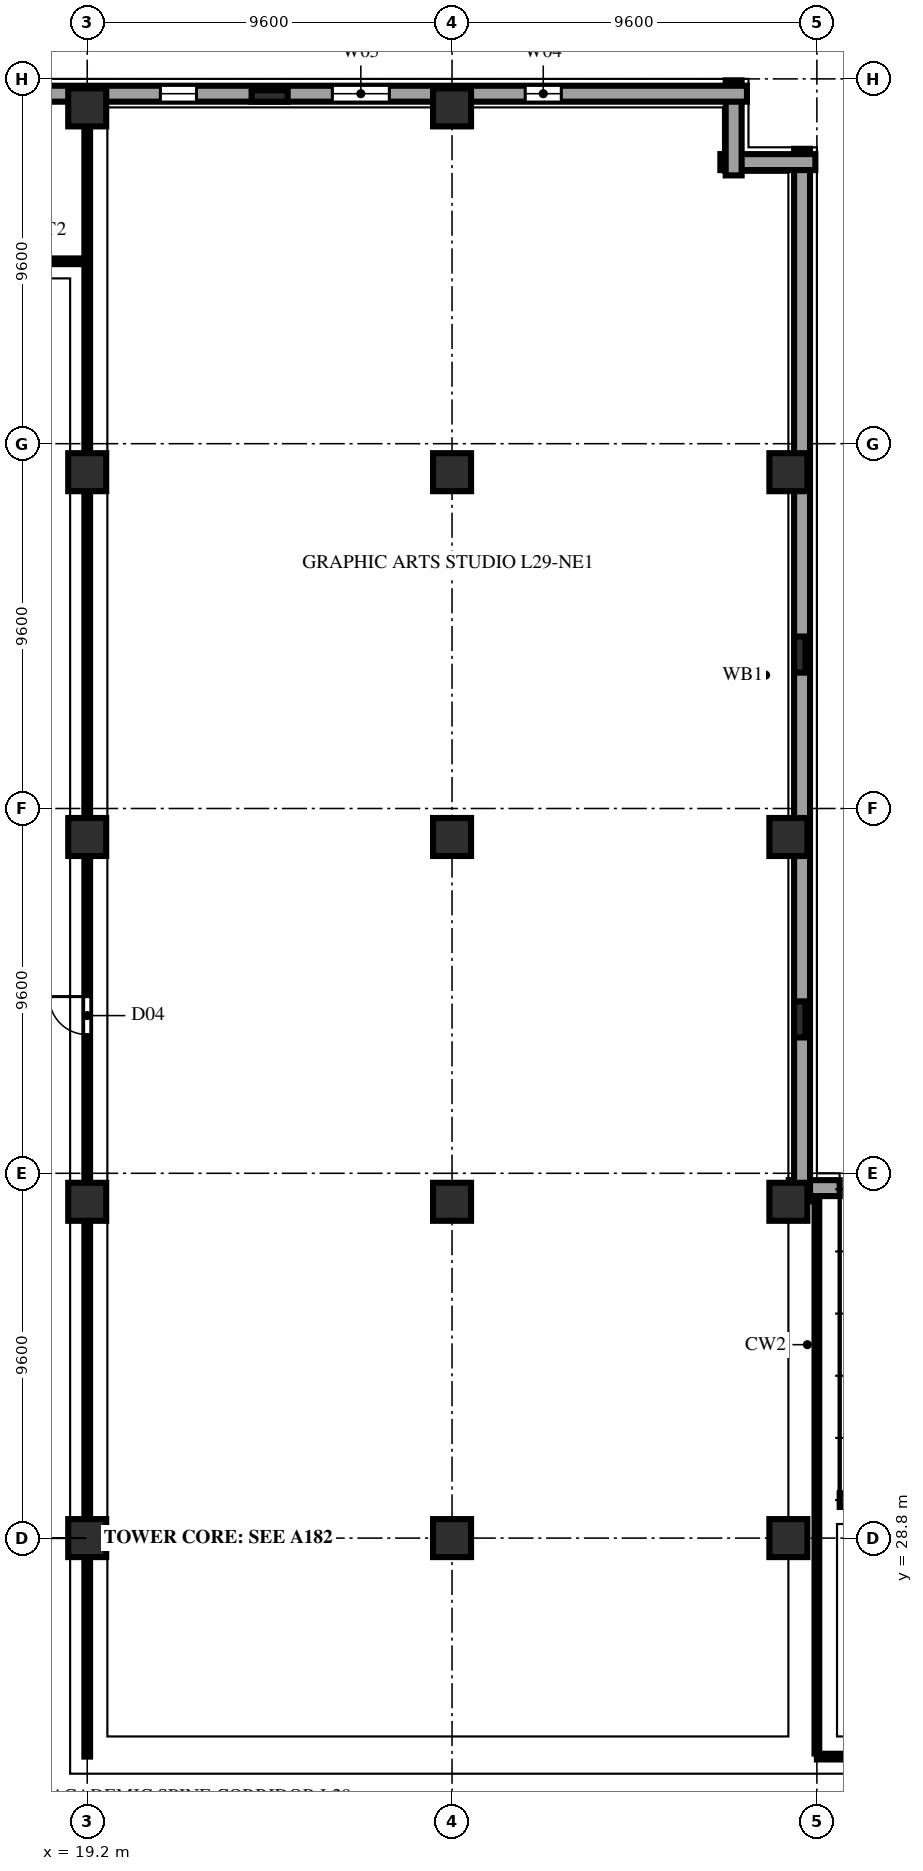
"""IFC4 building model, lengths in metres.
Left out: names, types, materials, properties, quantities, classifications, styles, units other than length and angle.
Written with IfcOpenShell. Run it as: python <this file> out.ifc"""

import sys

from ifc_helpers import new_model, si_unit, direction, frame, frame_2d, origin, origin_2d, place, context, subcontext, project, spatial, rectangle, extrude, element, fill, save


model = new_model("IFC4")
c1 = context("Model", 3, precision=1e-05, world=origin(), true_north=direction((0.0, 1.0)))
c2 = subcontext(c1, "Body", "Model", "MODEL_VIEW")
j1 = project(units=[si_unit("LENGTHUNIT", "METRE"), si_unit("PLANEANGLEUNIT", "RADIAN")], contexts=[c1])
p1 = place(None, origin())
s1 = spatial("IfcSite", under=j1, at=p1, CompositionType="ELEMENT")
p2 = place(p1, origin())
s2 = spatial("IfcBuilding", under=s1, at=p2, CompositionType="ELEMENT")
p3 = place(p2, frame((0.0, 0.0, 116.6)))
s3 = spatial("IfcBuildingStorey", under=s2, at=p3, CompositionType="ELEMENT", Elevation=116.6)
for number, where, z_axis, x_axis in (
    (1, (19.2, 28.8, 0.0), (0.0, 0.0, 1.0), (1.0, 0.0, 0.0)),
    (2, (19.2, 37.65, 0.0), (0.0, 0.0, 1.0), (1.0, 0.0, 0.0)),
    (3, (19.2, 47.25, 0.0), (0.0, 0.0, 1.0), (1.0, 0.0, 0.0)),
    (4, (19.2, 56.85, 0.0), (0.0, 0.0, 1.0), (1.0, 0.0, 0.0)),
    (5, (19.2, 66.45, 0.0), (0.0, 0.0, 1.0), (1.0, 0.0, 0.0)),
    (6, (28.8, 28.8, 0.0), (0.0, 0.0, 1.0), (1.0, 0.0, 0.0)),
    (7, (28.8, 37.65, 0.0), (0.0, 0.0, 1.0), (1.0, 0.0, 0.0)),
    (8, (28.8, 47.25, 0.0), (0.0, 0.0, 1.0), (1.0, 0.0, 0.0)),
    (9, (28.8, 56.85, 0.0), (0.0, 0.0, 1.0), (1.0, 0.0, 0.0)),
    (10, (28.8, 66.45, 0.0), (0.0, 0.0, 1.0), (1.0, 0.0, 0.0)),
    (11, (37.65, 28.8, 0.0), (0.0, 0.0, 1.0), (1.0, 0.0, 0.0)),
    (12, (37.65, 37.65, 0.0), (0.0, 0.0, 1.0), (1.0, 0.0, 0.0)),
    (13, (37.65, 47.25, 0.0), (0.0, 0.0, 1.0), (1.0, 0.0, 0.0)),
    (14, (37.65, 56.85, 0.0), (0.0, 0.0, 1.0), (1.0, 0.0, 0.0)),
):
    element("IfcColumn", number, at=place(p3, frame(where, z_axis=z_axis, x_axis=x_axis)), inside=s3, PredefinedType="COLUMN", context=c2, shape_type="SweptSolid", body=[
        extrude(rectangle(XDim=1.0, YDim=1.0, at=origin_2d()), origin(), (0.0, 0.0, 1.0), 3.8),
    ])
for number, where, z_axis, x_axis in (
    (15, (24.0, 66.75, 0.0), (0.0, 0.0, 1.0), (1.0, 0.0, 0.0)),
    (16, (37.95, 42.45, 0.0), (0.0, 0.0, 1.0), (0.0, 1.0, 0.0)),
    (17, (37.95, 52.05, 0.0), (0.0, 0.0, 1.0), (0.0, 1.0, 0.0)),
):
    element("IfcColumn", number, at=place(p3, frame(where, z_axis=z_axis, x_axis=x_axis)), inside=s3, PredefinedType="PILASTER", context=c2, shape_type="SweptSolid", body=[
        extrude(rectangle(XDim=0.95, YDim=0.3, at=origin_2d()), origin(), (0.0, 0.0, 1.0), 3.8),
    ])
p4 = place(p3, frame((39.0, 38.01, 0.0), z_axis=(0.0, 0.0, 1.0), x_axis=(-1.0, 0.0, 0.0)))
e18 = element("IfcWall", 18, at=p4, inside=s3, PredefinedType="SOLIDWALL", context=c2, shape_type="SweptSolid", body=[
    extrude(rectangle(XDim=1.34, YDim=0.42, at=frame_2d((0.67, 0.0))), origin(), (0.0, 0.0, 1.0), 2.14),
])
p5 = place(p3, frame((38.01, 37.66, 0.0), z_axis=(0.0, 0.0, 1.0), x_axis=(0.0, 1.0, 0.0)))
e19 = element("IfcWall", 19, at=p5, inside=s3, PredefinedType="SOLIDWALL", context=c2, shape_type="SweptSolid", body=[
    extrude(rectangle(XDim=27.7, YDim=0.42, at=frame_2d((13.85, 0.0))), origin(), (0.0, 0.0, 1.0), 3.54),
])
for number, where, z_axis, x_axis in (
    (20, (38.36, 65.01, 0.0), (0.0, 0.0, 1.0), (-1.0, 0.0, 0.0)),
    (21, (36.21, 64.66, 0.0), (0.0, 0.0, 1.0), (0.0, 1.0, 0.0)),
):
    element("IfcWall", number, at=place(p3, frame(where, z_axis=z_axis, x_axis=x_axis)), inside=s3, PredefinedType="SOLIDWALL", context=c2, shape_type="SweptSolid", body=[
        extrude(rectangle(XDim=2.5, YDim=0.42, at=frame_2d((1.25, 0.0))), origin(), (0.0, 0.0, 1.0), 3.54),
    ])
p6 = place(p3, frame((36.56, 66.81, 0.0), z_axis=(0.0, 0.0, 1.0), x_axis=(-1.0, 0.0, 0.0)))
e22 = element("IfcWall", 22, at=p6, inside=s3, PredefinedType="SOLIDWALL", context=c2, shape_type="SweptSolid", body=[
    extrude(rectangle(XDim=34.72, YDim=0.42, at=frame_2d((17.36, 0.0))), origin(), (0.0, 0.0, 1.0), 3.54),
])
p7 = place(p6, frame((4.885, 0.0, 0.9)))
e23 = element("IfcOpeningElement", 23, at=p7, cuts=e22, PredefinedType="OPENING", context=c2, shape_type="SweptSolid", body=[
    extrude(rectangle(XDim=0.95, YDim=1.85, at=frame_2d((0.475, 0.925))), frame((0.0, 0.222, 0.0), z_axis=(0.0, -1.0, 0.0), x_axis=(1.0, 0.0, 0.0)), (0.0, 0.0, 1.0), 0.444),
])
p8 = place(p6, frame((9.41, 0.0, 0.9)))
e24 = element("IfcOpeningElement", 24, at=p8, cuts=e22, PredefinedType="OPENING", context=c2, shape_type="SweptSolid", body=[
    extrude(rectangle(XDim=1.5, YDim=1.85, at=frame_2d((0.75, 0.925))), frame((0.0, 0.222, 0.0), z_axis=(0.0, -1.0, 0.0), x_axis=(1.0, 0.0, 0.0)), (0.0, 0.0, 1.0), 0.444),
])
p9 = place(p6, frame((14.485, 0.0, 0.9)))
e25 = element("IfcOpeningElement", 25, at=p9, cuts=e22, PredefinedType="OPENING", context=c2, shape_type="SweptSolid", body=[
    extrude(rectangle(XDim=0.95, YDim=1.85, at=frame_2d((0.475, 0.925))), frame((0.0, 0.222, 0.0), z_axis=(0.0, -1.0, 0.0), x_axis=(1.0, 0.0, 0.0)), (0.0, 0.0, 1.0), 0.444),
])
p10 = place(p3, frame((39.0, 29.8, 0.0), z_axis=(0.0, 0.0, 1.0), x_axis=(1.0, 0.0, 0.0)))
e26 = element("IfcWall", 26, at=p10, inside=s3, PredefinedType="SOLIDWALL", context=c2, shape_type="SweptSolid", body=[
    extrude(rectangle(XDim=2.8, YDim=0.36, at=frame_2d((1.4, 0.0))), origin(), (0.0, 0.0, 1.0), 3.54),
])
p11 = place(p3, frame((17.05, 62.4, 0.0), z_axis=(0.0, 0.0, 1.0), x_axis=(1.0, 0.0, 0.0)))
e27 = element("IfcWall", 27, at=p11, inside=s3, PredefinedType="PARTITIONING", context=c2, shape_type="SweptSolid", body=[
    extrude(rectangle(XDim=2.15, YDim=0.15, at=frame_2d((1.075, 0.0))), origin(), (0.0, 0.0, 1.0), 3.54),
])
p12 = place(p3, frame((38.4, 23.05, 0.0), z_axis=(0.0, 0.0, 1.0), x_axis=(1.0, 0.0, 0.0)))
e28 = element("IfcWall", 28, at=p12, inside=s3, PredefinedType="PARTITIONING", context=c2, shape_type="SweptSolid", body=[
    extrude(rectangle(XDim=9.52, YDim=0.15, at=frame_2d((4.76, 0.0))), origin(), (0.0, 0.0, 1.0), 3.54),
])
p13 = place(p12, frame((3.6, 0.0, 0.0)))
e29 = element("IfcOpeningElement", 29, at=p13, cuts=e28, PredefinedType="OPENING", context=c2, shape_type="SweptSolid", body=[
    extrude(rectangle(XDim=1.2, YDim=2.2, at=frame_2d((0.6, 1.1))), frame((0.0, 0.087, 0.0), z_axis=(0.0, -1.0, 0.0), x_axis=(1.0, 0.0, 0.0)), (0.0, 0.0, 1.0), 0.174),
])
p14 = place(p3, frame((38.4, 23.13, 0.0), z_axis=(0.0, 0.0, 1.0), x_axis=(0.0, 1.0, 0.0)))
e30 = element("IfcWall", 30, at=p14, inside=s3, PredefinedType="PARTITIONING", context=c2, shape_type="SweptSolid", body=[
    extrude(rectangle(XDim=14.66, YDim=0.125, at=frame_2d((7.33, 0.0))), origin(), (0.0, 0.0, 1.0), 3.54),
])
p15 = place(p3, frame((19.2, 23.05, 0.0), z_axis=(0.0, 0.0, 1.0), x_axis=(0.0, 1.0, 0.0)))
e31 = element("IfcWall", 31, at=p15, inside=s3, PredefinedType="PARTITIONING", context=c2, shape_type="SweptSolid", body=[
    extrude(rectangle(XDim=43.4, YDim=0.15, at=frame_2d((21.7, 0.0))), origin(), (0.0, 0.0, 1.0), 2.923),
])
p16 = place(p15, frame((19.0, 0.0, 0.0)))
e32 = element("IfcOpeningElement", 32, at=p16, cuts=e31, PredefinedType="OPENING", context=c2, shape_type="SweptSolid", body=[
    extrude(rectangle(XDim=1.0, YDim=2.2, at=frame_2d((0.5, 1.1))), frame((0.0, 0.087, 0.0), z_axis=(0.0, -1.0, 0.0), x_axis=(1.0, 0.0, 0.0)), (0.0, 0.0, 1.0), 0.174),
])
p17 = place(p3, frame((19.2, 66.45, 0.0), z_axis=(0.0, 0.0, 1.0), x_axis=(0.0, 1.0, 0.0)))
e33 = element("IfcWall", 33, at=p17, inside=s3, PredefinedType="PARTITIONING", context=c2, shape_type="SweptSolid", body=[
    extrude(rectangle(XDim=0.53, YDim=0.15, at=frame_2d((0.265, 0.0))), origin(), (0.0, 0.0, 1.0), 3.54),
])
p18 = place(p7, origin())
e34 = element("IfcWindow", 34, at=p18, inside=s3, PartitioningType="SINGLE_PANEL", PredefinedType="WINDOW", context=c2, shape_type="SweptSolid", body=[
    extrude(rectangle(XDim=0.95, YDim=1.85, at=frame_2d((0.475, 0.925))), frame((0.0, 0.11, 0.0), z_axis=(0.0, -1.0, 0.0), x_axis=(1.0, 0.0, 0.0)), (0.0, 0.0, 1.0), 0.06),
])
fill(e23, e34)
p19 = place(p8, origin())
e35 = element("IfcWindow", 35, at=p19, inside=s3, PartitioningType="DOUBLE_PANEL_VERTICAL", PredefinedType="WINDOW", context=c2, shape_type="SweptSolid", body=[
    extrude(rectangle(XDim=1.5, YDim=1.85, at=frame_2d((0.75, 0.925))), frame((0.0, 0.11, 0.0), z_axis=(0.0, -1.0, 0.0), x_axis=(1.0, 0.0, 0.0)), (0.0, 0.0, 1.0), 0.06),
])
fill(e24, e35)
p20 = place(p9, origin())
e36 = element("IfcWindow", 36, at=p20, inside=s3, PartitioningType="SINGLE_PANEL", PredefinedType="WINDOW", context=c2, shape_type="SweptSolid", body=[
    extrude(rectangle(XDim=0.95, YDim=1.85, at=frame_2d((0.475, 0.925))), frame((0.0, 0.11, 0.0), z_axis=(0.0, -1.0, 0.0), x_axis=(1.0, 0.0, 0.0)), (0.0, 0.0, 1.0), 0.06),
])
fill(e25, e36)
p21 = place(p16, origin())
e37 = element("IfcDoor", 37, at=p21, inside=s3, OperationType="SINGLE_SWING_RIGHT", PredefinedType="DOOR", context=c2, shape_type="SweptSolid", body=[
    extrude(rectangle(XDim=1.0, YDim=2.2, at=frame_2d((0.5, 1.1))), frame((0.0, 0.025, 0.0), z_axis=(0.0, -1.0, 0.0), x_axis=(1.0, 0.0, 0.0)), (0.0, 0.0, 1.0), 0.05),
])
fill(e32, e37)
save(model, sys.argv[1])
